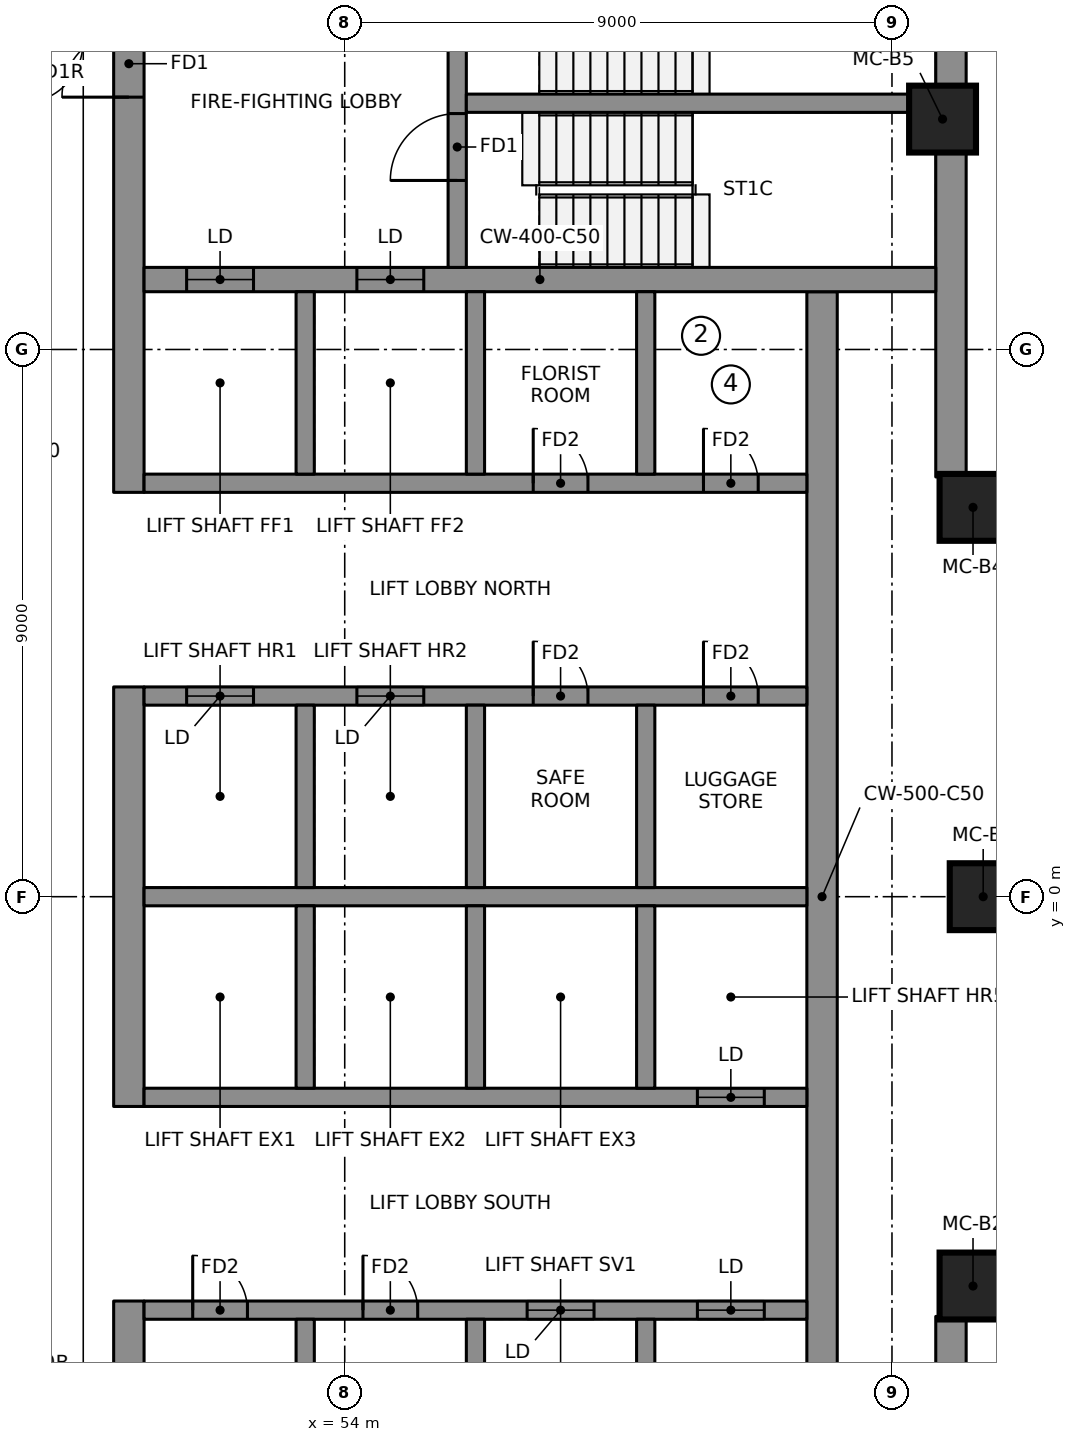
"""IFC4 building model, lengths in metres.
Left out: names, types, materials, properties, quantities, classifications, styles, units other than length and angle.
Written with IfcOpenShell. Run it as: python <this file> out.ifc"""

import sys

from ifc_helpers import new_model, si_unit, direction, frame, frame_2d, origin, origin_2d, place, context, subcontext, project, spatial, polyline, rectangle, outline, extrude, element, fill, save


model = new_model("IFC4")
c1 = context("Model", 3, precision=1e-05, world=origin(), true_north=direction((0.0, 1.0)))
c2 = subcontext(c1, "Body", "Model", "MODEL_VIEW")
j1 = project(units=[si_unit("LENGTHUNIT", "METRE"), si_unit("PLANEANGLEUNIT", "RADIAN")], contexts=[c1])
p1 = place(None, origin())
s1 = spatial("IfcSite", under=j1, at=p1, CompositionType="ELEMENT")
p2 = place(p1, origin())
s2 = spatial("IfcBuilding", under=s1, at=p2, CompositionType="ELEMENT")
p3 = place(p2, frame((0.0, 0.0, 292.75)))
s3 = spatial("IfcBuildingStorey", under=s2, at=p3, CompositionType="ELEMENT", Elevation=292.75)
p4 = place(p3, frame((50.45, 6.65, 0.0), z_axis=(0.0, 0.0, 1.0), x_axis=(0.0, 1.0, 0.0)))
e1 = element("IfcWall", 1, at=p4, inside=s3, PredefinedType="SHEAR", context=c2, shape_type="SweptSolid", body=[
    extrude(rectangle(XDim=9.6, YDim=0.5, at=frame_2d((4.8, 0.0))), origin(), (0.0, 0.0, 1.0), 3.55),
])
p5 = place(p4, frame((6.5, 0.0, 0.0)))
e2 = element("IfcOpeningElement", 2, at=p5, cuts=e1, PredefinedType="OPENING", context=c2, shape_type="SweptSolid", body=[
    extrude(rectangle(XDim=1.1, YDim=2.1, at=frame_2d((0.55, 1.05))), frame((0.0, 0.26, 0.0), z_axis=(0.0, -1.0, 0.0), x_axis=(1.0, 0.0, 0.0)), (0.0, 0.0, 1.0), 0.52),
])
p6 = place(p3, frame((50.45, -3.45, 0.0), z_axis=(0.0, 0.0, 1.0), x_axis=(0.0, 1.0, 0.0)))
e3 = element("IfcWall", 3, at=p6, inside=s3, PredefinedType="SHEAR", context=c2, shape_type="SweptSolid", body=[
    extrude(rectangle(XDim=6.9, YDim=0.5, at=frame_2d((3.45, 0.0))), origin(), (0.0, 0.0, 1.0), 3.55),
])
p7 = place(p3, frame((50.45, -16.25, 0.0), z_axis=(0.0, 0.0, 1.0), x_axis=(0.0, 1.0, 0.0)))
e4 = element("IfcWall", 4, at=p7, inside=s3, PredefinedType="SHEAR", context=c2, shape_type="SweptSolid", body=[
    extrude(rectangle(XDim=9.6, YDim=0.5, at=frame_2d((4.8, 0.0))), origin(), (0.0, 0.0, 1.0), 3.55),
])
p8 = place(p7, frame((2.0, 0.0, 0.0)))
e5 = element("IfcOpeningElement", 5, at=p8, cuts=e4, PredefinedType="OPENING", context=c2, shape_type="SweptSolid", body=[
    extrude(rectangle(XDim=1.1, YDim=2.1, at=frame_2d((0.55, 1.05))), frame((0.0, 0.26, 0.0), z_axis=(0.0, -1.0, 0.0), x_axis=(1.0, 0.0, 0.0)), (0.0, 0.0, 1.0), 0.52),
])
for number, where, z_axis, x_axis in (
    (6, (63.97, 6.903, 0.0), (0.0, 0.0, 1.0), (0.0, 1.0, 0.0)),
    (7, (63.97, -15.75, 0.0), (0.0, 0.0, 1.0), (0.0, 1.0, 0.0)),
):
    element("IfcWall", number, at=place(p3, frame(where, z_axis=z_axis, x_axis=x_axis)), inside=s3, PredefinedType="SHEAR", context=c2, shape_type="SweptSolid", body=[
        extrude(rectangle(XDim=8.847, YDim=0.5, at=frame_2d((4.423, 0.0))), origin(), (0.0, 0.0, 1.0), 3.55),
    ])
p9 = place(p3, frame((61.85, -9.95, 0.0), z_axis=(0.0, 0.0, 1.0), x_axis=(0.0, 1.0, 0.0)))
e8 = element("IfcWall", 8, at=p9, inside=s3, PredefinedType="SHEAR", context=c2, shape_type="SweptSolid", body=[
    extrude(rectangle(XDim=19.9, YDim=0.5, at=frame_2d((9.95, 0.0))), origin(), (0.0, 0.0, 1.0), 3.55),
])
p10 = place(p3, frame((50.7, 10.15, 0.0), z_axis=(0.0, 0.0, 1.0), x_axis=(1.0, 0.0, 0.0)))
e9 = element("IfcWall", 9, at=p10, inside=s3, PredefinedType="SHEAR", context=c2, shape_type="SweptSolid", body=[
    extrude(rectangle(XDim=13.02, YDim=0.4, at=frame_2d((6.51, 0.0))), origin(), (0.0, 0.0, 1.0), 3.55),
])
p11 = place(p10, frame((0.7, 0.0, 0.0)))
e10 = element("IfcOpeningElement", 10, at=p11, cuts=e9, PredefinedType="OPENING", context=c2, shape_type="SweptSolid", body=[
    extrude(rectangle(XDim=1.1, YDim=2.1, at=frame_2d((0.55, 1.05))), frame((0.0, 0.21, 0.0), z_axis=(0.0, -1.0, 0.0), x_axis=(1.0, 0.0, 0.0)), (0.0, 0.0, 1.0), 0.42),
])
p12 = place(p10, frame((3.5, 0.0, 0.0)))
e11 = element("IfcOpeningElement", 11, at=p12, cuts=e9, PredefinedType="OPENING", context=c2, shape_type="SweptSolid", body=[
    extrude(rectangle(XDim=1.1, YDim=2.1, at=frame_2d((0.55, 1.05))), frame((0.0, 0.21, 0.0), z_axis=(0.0, -1.0, 0.0), x_axis=(1.0, 0.0, 0.0)), (0.0, 0.0, 1.0), 0.42),
])
p13 = place(p3, frame((50.7, 0.0, 0.0), z_axis=(0.0, 0.0, 1.0), x_axis=(1.0, 0.0, 0.0)))
e12 = element("IfcWall", 12, at=p13, inside=s3, PredefinedType="SHEAR", context=c2, shape_type="SweptSolid", body=[
    extrude(rectangle(XDim=10.9, YDim=0.3, at=frame_2d((5.45, 0.0))), origin(), (0.0, 0.0, 1.0), 3.55),
])
p14 = place(p3, frame((50.7, 3.3, 0.0), z_axis=(0.0, 0.0, 1.0), x_axis=(1.0, 0.0, 0.0)))
e13 = element("IfcWall", 13, at=p14, inside=s3, PredefinedType="SHEAR", context=c2, shape_type="SweptSolid", body=[
    extrude(rectangle(XDim=10.9, YDim=0.3, at=frame_2d((5.45, 0.0))), origin(), (0.0, 0.0, 1.0), 3.55),
])
p15 = place(p14, frame((0.7, 0.0, 0.0)))
e14 = element("IfcOpeningElement", 14, at=p15, cuts=e13, PredefinedType="OPENING", context=c2, shape_type="SweptSolid", body=[
    extrude(rectangle(XDim=1.1, YDim=2.1, at=frame_2d((0.55, 1.05))), frame((0.0, 0.16, 0.0), z_axis=(0.0, -1.0, 0.0), x_axis=(1.0, 0.0, 0.0)), (0.0, 0.0, 1.0), 0.32),
])
p16 = place(p14, frame((3.5, 0.0, 0.0)))
e15 = element("IfcOpeningElement", 15, at=p16, cuts=e13, PredefinedType="OPENING", context=c2, shape_type="SweptSolid", body=[
    extrude(rectangle(XDim=1.1, YDim=2.1, at=frame_2d((0.55, 1.05))), frame((0.0, 0.16, 0.0), z_axis=(0.0, -1.0, 0.0), x_axis=(1.0, 0.0, 0.0)), (0.0, 0.0, 1.0), 0.32),
])
p17 = place(p14, frame((6.4, 0.0, 0.0)))
e16 = element("IfcOpeningElement", 16, at=p17, cuts=e13, PredefinedType="OPENING", context=c2, shape_type="SweptSolid", body=[
    extrude(rectangle(XDim=0.9, YDim=2.1, at=frame_2d((0.45, 1.05))), frame((0.0, 0.16, 0.0), z_axis=(0.0, -1.0, 0.0), x_axis=(1.0, 0.0, 0.0)), (0.0, 0.0, 1.0), 0.32),
])
p18 = place(p14, frame((9.2, 0.0, 0.0)))
e17 = element("IfcOpeningElement", 17, at=p18, cuts=e13, PredefinedType="OPENING", context=c2, shape_type="SweptSolid", body=[
    extrude(rectangle(XDim=0.9, YDim=2.1, at=frame_2d((0.45, 1.05))), frame((0.0, 0.16, 0.0), z_axis=(0.0, -1.0, 0.0), x_axis=(1.0, 0.0, 0.0)), (0.0, 0.0, 1.0), 0.32),
])
p19 = place(p3, frame((50.7, 6.8, 0.0), z_axis=(0.0, 0.0, 1.0), x_axis=(1.0, 0.0, 0.0)))
e18 = element("IfcWall", 18, at=p19, inside=s3, PredefinedType="SHEAR", context=c2, shape_type="SweptSolid", body=[
    extrude(rectangle(XDim=10.9, YDim=0.3, at=frame_2d((5.45, 0.0))), origin(), (0.0, 0.0, 1.0), 3.55),
])
p20 = place(p19, frame((6.4, 0.0, 0.0)))
e19 = element("IfcOpeningElement", 19, at=p20, cuts=e18, PredefinedType="OPENING", context=c2, shape_type="SweptSolid", body=[
    extrude(rectangle(XDim=0.9, YDim=2.1, at=frame_2d((0.45, 1.05))), frame((0.0, 0.16, 0.0), z_axis=(0.0, -1.0, 0.0), x_axis=(1.0, 0.0, 0.0)), (0.0, 0.0, 1.0), 0.32),
])
p21 = place(p19, frame((9.2, 0.0, 0.0)))
e20 = element("IfcOpeningElement", 20, at=p21, cuts=e18, PredefinedType="OPENING", context=c2, shape_type="SweptSolid", body=[
    extrude(rectangle(XDim=0.9, YDim=2.1, at=frame_2d((0.45, 1.05))), frame((0.0, 0.16, 0.0), z_axis=(0.0, -1.0, 0.0), x_axis=(1.0, 0.0, 0.0)), (0.0, 0.0, 1.0), 0.32),
])
for number, where, z_axis, x_axis in (
    (21, (53.35, 0.15, 0.0), (0.0, 0.0, 1.0), (0.0, 1.0, 0.0)),
    (22, (53.35, 6.95, 0.0), (0.0, 0.0, 1.0), (0.0, 1.0, 0.0)),
    (23, (56.15, 0.15, 0.0), (0.0, 0.0, 1.0), (0.0, 1.0, 0.0)),
    (24, (56.15, 6.95, 0.0), (0.0, 0.0, 1.0), (0.0, 1.0, 0.0)),
    (25, (58.95, 0.15, 0.0), (0.0, 0.0, 1.0), (0.0, 1.0, 0.0)),
    (26, (58.95, 6.95, 0.0), (0.0, 0.0, 1.0), (0.0, 1.0, 0.0)),
):
    element("IfcWall", number, at=place(p3, frame(where, z_axis=z_axis, x_axis=x_axis)), inside=s3, PredefinedType="SHEAR", context=c2, shape_type="SweptSolid", body=[
        extrude(rectangle(XDim=3.0, YDim=0.3, at=frame_2d((1.5, 0.0))), origin(), (0.0, 0.0, 1.0), 3.55),
    ])
p22 = place(p3, frame((50.7, -3.3, 0.0), z_axis=(0.0, 0.0, 1.0), x_axis=(1.0, 0.0, 0.0)))
e27 = element("IfcWall", 27, at=p22, inside=s3, PredefinedType="SHEAR", context=c2, shape_type="SweptSolid", body=[
    extrude(rectangle(XDim=10.9, YDim=0.3, at=frame_2d((5.45, 0.0))), origin(), (0.0, 0.0, 1.0), 3.55),
])
p23 = place(p22, frame((9.1, 0.0, 0.0)))
e28 = element("IfcOpeningElement", 28, at=p23, cuts=e27, PredefinedType="OPENING", context=c2, shape_type="SweptSolid", body=[
    extrude(rectangle(XDim=1.1, YDim=2.1, at=frame_2d((0.55, 1.05))), frame((0.0, 0.16, 0.0), z_axis=(0.0, -1.0, 0.0), x_axis=(1.0, 0.0, 0.0)), (0.0, 0.0, 1.0), 0.32),
])
p24 = place(p3, frame((50.7, -6.8, 0.0), z_axis=(0.0, 0.0, 1.0), x_axis=(1.0, 0.0, 0.0)))
e29 = element("IfcWall", 29, at=p24, inside=s3, PredefinedType="SHEAR", context=c2, shape_type="SweptSolid", body=[
    extrude(rectangle(XDim=10.9, YDim=0.3, at=frame_2d((5.45, 0.0))), origin(), (0.0, 0.0, 1.0), 3.55),
])
p25 = place(p24, frame((6.3, 0.0, 0.0)))
e30 = element("IfcOpeningElement", 30, at=p25, cuts=e29, PredefinedType="OPENING", context=c2, shape_type="SweptSolid", body=[
    extrude(rectangle(XDim=1.1, YDim=2.1, at=frame_2d((0.55, 1.05))), frame((0.0, 0.16, 0.0), z_axis=(0.0, -1.0, 0.0), x_axis=(1.0, 0.0, 0.0)), (0.0, 0.0, 1.0), 0.32),
])
p26 = place(p24, frame((9.1, 0.0, 0.0)))
e31 = element("IfcOpeningElement", 31, at=p26, cuts=e29, PredefinedType="OPENING", context=c2, shape_type="SweptSolid", body=[
    extrude(rectangle(XDim=1.1, YDim=2.1, at=frame_2d((0.55, 1.05))), frame((0.0, 0.16, 0.0), z_axis=(0.0, -1.0, 0.0), x_axis=(1.0, 0.0, 0.0)), (0.0, 0.0, 1.0), 0.32),
])
p27 = place(p24, frame((0.8, 0.0, 0.0)))
e32 = element("IfcOpeningElement", 32, at=p27, cuts=e29, PredefinedType="OPENING", context=c2, shape_type="SweptSolid", body=[
    extrude(rectangle(XDim=0.9, YDim=2.1, at=frame_2d((0.45, 1.05))), frame((0.0, 0.16, 0.0), z_axis=(0.0, -1.0, 0.0), x_axis=(1.0, 0.0, 0.0)), (0.0, 0.0, 1.0), 0.32),
])
p28 = place(p24, frame((3.6, 0.0, 0.0)))
e33 = element("IfcOpeningElement", 33, at=p28, cuts=e29, PredefinedType="OPENING", context=c2, shape_type="SweptSolid", body=[
    extrude(rectangle(XDim=0.9, YDim=2.1, at=frame_2d((0.45, 1.05))), frame((0.0, 0.16, 0.0), z_axis=(0.0, -1.0, 0.0), x_axis=(1.0, 0.0, 0.0)), (0.0, 0.0, 1.0), 0.32),
])
for number, where, z_axis, x_axis in (
    (34, (53.35, -3.15, 0.0), (0.0, 0.0, 1.0), (0.0, 1.0, 0.0)),
    (35, (53.35, -9.95, 0.0), (0.0, 0.0, 1.0), (0.0, 1.0, 0.0)),
    (36, (56.15, -3.15, 0.0), (0.0, 0.0, 1.0), (0.0, 1.0, 0.0)),
    (37, (56.15, -9.95, 0.0), (0.0, 0.0, 1.0), (0.0, 1.0, 0.0)),
    (38, (58.95, -3.15, 0.0), (0.0, 0.0, 1.0), (0.0, 1.0, 0.0)),
    (39, (58.95, -9.95, 0.0), (0.0, 0.0, 1.0), (0.0, 1.0, 0.0)),
):
    element("IfcWall", number, at=place(p3, frame(where, z_axis=z_axis, x_axis=x_axis)), inside=s3, PredefinedType="SHEAR", context=c2, shape_type="SweptSolid", body=[
        extrude(rectangle(XDim=3.0, YDim=0.3, at=frame_2d((1.5, 0.0))), origin(), (0.0, 0.0, 1.0), 3.55),
    ])
p29 = place(p3, frame((55.85, 10.35, 0.0), z_axis=(0.0, 0.0, 1.0), x_axis=(0.0, 1.0, 0.0)))
e40 = element("IfcWall", 40, at=p29, inside=s3, PredefinedType="SHEAR", context=c2, shape_type="SweptSolid", body=[
    extrude(rectangle(XDim=5.4, YDim=0.3, at=frame_2d((2.7, 0.0))), origin(), (0.0, 0.0, 1.0), 3.55),
])
p30 = place(p29, frame((1.43, 0.0, 0.0)))
e41 = element("IfcOpeningElement", 41, at=p30, cuts=e40, PredefinedType="OPENING", context=c2, shape_type="SweptSolid", body=[
    extrude(rectangle(XDim=1.1, YDim=2.1, at=frame_2d((0.55, 1.05))), frame((0.0, 0.16, 0.0), z_axis=(0.0, -1.0, 0.0), x_axis=(1.0, 0.0, 0.0)), (0.0, 0.0, 1.0), 0.32),
])
p31 = place(p29, frame((3.6, 0.0, 0.0)))
e42 = element("IfcOpeningElement", 42, at=p31, cuts=e40, PredefinedType="OPENING", context=c2, shape_type="SweptSolid", body=[
    extrude(rectangle(XDim=1.1, YDim=2.1, at=frame_2d((0.55, 1.05))), frame((0.0, 0.16, 0.0), z_axis=(0.0, -1.0, 0.0), x_axis=(1.0, 0.0, 0.0)), (0.0, 0.0, 1.0), 0.32),
])
p32 = place(p3, frame((56.0, 13.05, 0.0), z_axis=(0.0, 0.0, 1.0), x_axis=(1.0, 0.0, 0.0)))
e43 = element("IfcWall", 43, at=p32, inside=s3, PredefinedType="SHEAR", context=c2, shape_type="SweptSolid", body=[
    extrude(rectangle(XDim=7.72, YDim=0.3, at=frame_2d((3.86, 0.0))), origin(), (0.0, 0.0, 1.0), 3.55),
])
for number, where, z_axis, x_axis in (
    (44, (64.333, -6.403, 0.0), (0.0, 0.0, 1.0), (1.0, 0.0, 0.0)),
    (45, (64.5, 0.0, 0.0), (0.0, 0.0, 1.0), (1.0, 0.0, 0.0)),
    (46, (64.333, 6.403, 0.0), (0.0, 0.0, 1.0), (1.0, 0.0, 0.0)),
    (47, (63.832, 12.789, 0.0), (0.0, 0.0, 1.0), (1.0, 0.0, 0.0)),
):
    element("IfcColumn", number, at=place(p3, frame(where, z_axis=z_axis, x_axis=x_axis)), inside=s3, PredefinedType="COLUMN", context=c2, shape_type="SweptSolid", body=[
        extrude(rectangle(XDim=1.1, YDim=1.1, at=origin_2d()), origin(), (0.0, 0.0, 1.0), 3.55),
    ])
p33 = place(p3, frame((65.331, 10.571, 0.0), z_axis=(0.0, 0.0, 1.0), x_axis=(-0.102249826987, 0.994758751096, 0.0)))
e48 = element("IfcWall", 48, at=p33, inside=s3, PredefinedType="NOTDEFINED", context=c2, shape_type="SweptSolid", body=[
    extrude(outline(polyline([(-0.003, -0.2), (4.263, -0.2), (4.204, 0.2), (0.003, 0.2), (-0.003, -0.2)])), origin(), (0.0, 0.0, 1.0), 3.25),
])
p34 = place(p33, frame((0.417, 0.0, 0.5)))
e49 = element("IfcOpeningElement", 49, at=p34, cuts=e48, PredefinedType="OPENING", context=c2, shape_type="SweptSolid", body=[
    extrude(rectangle(XDim=2.4, YDim=2.0, at=frame_2d((1.2, 1.0))), frame((0.0, 0.21, 0.0), z_axis=(0.0, -1.0, 0.0), x_axis=(1.0, 0.0, 0.0)), (0.0, 0.0, 1.0), 0.42),
])
p35 = place(p11, origin())
e50 = element("IfcDoor", 50, at=p35, inside=s3, OperationType="DOUBLE_DOOR_SLIDING", PredefinedType="DOOR", context=c2, shape_type="SweptSolid", body=[
    extrude(rectangle(XDim=1.1, YDim=2.1, at=frame_2d((0.55, 1.05))), frame((0.0, 0.025, 0.0), z_axis=(0.0, -1.0, 0.0), x_axis=(1.0, 0.0, 0.0)), (0.0, 0.0, 1.0), 0.05),
])
fill(e10, e50)
p36 = place(p12, origin())
e51 = element("IfcDoor", 51, at=p36, inside=s3, OperationType="DOUBLE_DOOR_SLIDING", PredefinedType="DOOR", context=c2, shape_type="SweptSolid", body=[
    extrude(rectangle(XDim=1.1, YDim=2.1, at=frame_2d((0.55, 1.05))), frame((0.0, 0.025, 0.0), z_axis=(0.0, -1.0, 0.0), x_axis=(1.0, 0.0, 0.0)), (0.0, 0.0, 1.0), 0.05),
])
fill(e11, e51)
p37 = place(p15, origin())
e52 = element("IfcDoor", 52, at=p37, inside=s3, OperationType="DOUBLE_DOOR_SLIDING", PredefinedType="DOOR", context=c2, shape_type="SweptSolid", body=[
    extrude(rectangle(XDim=1.1, YDim=2.1, at=frame_2d((0.55, 1.05))), frame((0.0, 0.025, 0.0), z_axis=(0.0, -1.0, 0.0), x_axis=(1.0, 0.0, 0.0)), (0.0, 0.0, 1.0), 0.05),
])
fill(e14, e52)
p38 = place(p16, origin())
e53 = element("IfcDoor", 53, at=p38, inside=s3, OperationType="DOUBLE_DOOR_SLIDING", PredefinedType="DOOR", context=c2, shape_type="SweptSolid", body=[
    extrude(rectangle(XDim=1.1, YDim=2.1, at=frame_2d((0.55, 1.05))), frame((0.0, 0.025, 0.0), z_axis=(0.0, -1.0, 0.0), x_axis=(1.0, 0.0, 0.0)), (0.0, 0.0, 1.0), 0.05),
])
fill(e15, e53)
p39 = place(p23, origin())
e54 = element("IfcDoor", 54, at=p39, inside=s3, OperationType="DOUBLE_DOOR_SLIDING", PredefinedType="DOOR", context=c2, shape_type="SweptSolid", body=[
    extrude(rectangle(XDim=1.1, YDim=2.1, at=frame_2d((0.55, 1.05))), frame((0.0, 0.025, 0.0), z_axis=(0.0, -1.0, 0.0), x_axis=(1.0, 0.0, 0.0)), (0.0, 0.0, 1.0), 0.05),
])
fill(e28, e54)
p40 = place(p25, origin())
e55 = element("IfcDoor", 55, at=p40, inside=s3, OperationType="DOUBLE_DOOR_SLIDING", PredefinedType="DOOR", context=c2, shape_type="SweptSolid", body=[
    extrude(rectangle(XDim=1.1, YDim=2.1, at=frame_2d((0.55, 1.05))), frame((0.0, 0.025, 0.0), z_axis=(0.0, -1.0, 0.0), x_axis=(1.0, 0.0, 0.0)), (0.0, 0.0, 1.0), 0.05),
])
fill(e30, e55)
p41 = place(p26, origin())
e56 = element("IfcDoor", 56, at=p41, inside=s3, OperationType="DOUBLE_DOOR_SLIDING", PredefinedType="DOOR", context=c2, shape_type="SweptSolid", body=[
    extrude(rectangle(XDim=1.1, YDim=2.1, at=frame_2d((0.55, 1.05))), frame((0.0, 0.025, 0.0), z_axis=(0.0, -1.0, 0.0), x_axis=(1.0, 0.0, 0.0)), (0.0, 0.0, 1.0), 0.05),
])
fill(e31, e56)
p42 = place(p30, origin())
e57 = element("IfcDoor", 57, at=p42, inside=s3, OperationType="SINGLE_SWING_RIGHT", PredefinedType="DOOR", context=c2, shape_type="SweptSolid", body=[
    extrude(rectangle(XDim=1.1, YDim=2.1, at=frame_2d((0.55, 1.05))), frame((0.0, 0.025, 0.0), z_axis=(0.0, -1.0, 0.0), x_axis=(1.0, 0.0, 0.0)), (0.0, 0.0, 1.0), 0.05),
])
fill(e41, e57)
p43 = place(p5, origin())
e58 = element("IfcDoor", 58, at=p43, inside=s3, OperationType="SINGLE_SWING_RIGHT", PredefinedType="DOOR", context=c2, shape_type="SweptSolid", body=[
    extrude(rectangle(XDim=1.1, YDim=2.1, at=frame_2d((0.55, 1.05))), frame((0.0, 0.025, 0.0), z_axis=(0.0, -1.0, 0.0), x_axis=(1.0, 0.0, 0.0)), (0.0, 0.0, 1.0), 0.05),
])
fill(e2, e58)
p44 = place(p20, origin())
e59 = element("IfcDoor", 59, at=p44, inside=s3, OperationType="SINGLE_SWING_LEFT", PredefinedType="DOOR", context=c2, shape_type="SweptSolid", body=[
    extrude(rectangle(XDim=0.9, YDim=2.1, at=frame_2d((0.45, 1.05))), frame((0.0, 0.025, 0.0), z_axis=(0.0, -1.0, 0.0), x_axis=(1.0, 0.0, 0.0)), (0.0, 0.0, 1.0), 0.05),
])
fill(e19, e59)
p45 = place(p21, origin())
e60 = element("IfcDoor", 60, at=p45, inside=s3, OperationType="SINGLE_SWING_LEFT", PredefinedType="DOOR", context=c2, shape_type="SweptSolid", body=[
    extrude(rectangle(XDim=0.9, YDim=2.1, at=frame_2d((0.45, 1.05))), frame((0.0, 0.025, 0.0), z_axis=(0.0, -1.0, 0.0), x_axis=(1.0, 0.0, 0.0)), (0.0, 0.0, 1.0), 0.05),
])
fill(e20, e60)
p46 = place(p17, origin())
e61 = element("IfcDoor", 61, at=p46, inside=s3, OperationType="SINGLE_SWING_LEFT", PredefinedType="DOOR", context=c2, shape_type="SweptSolid", body=[
    extrude(rectangle(XDim=0.9, YDim=2.1, at=frame_2d((0.45, 1.05))), frame((0.0, 0.025, 0.0), z_axis=(0.0, -1.0, 0.0), x_axis=(1.0, 0.0, 0.0)), (0.0, 0.0, 1.0), 0.05),
])
fill(e16, e61)
p47 = place(p18, origin())
e62 = element("IfcDoor", 62, at=p47, inside=s3, OperationType="SINGLE_SWING_LEFT", PredefinedType="DOOR", context=c2, shape_type="SweptSolid", body=[
    extrude(rectangle(XDim=0.9, YDim=2.1, at=frame_2d((0.45, 1.05))), frame((0.0, 0.025, 0.0), z_axis=(0.0, -1.0, 0.0), x_axis=(1.0, 0.0, 0.0)), (0.0, 0.0, 1.0), 0.05),
])
fill(e17, e62)
p48 = place(p27, origin())
e63 = element("IfcDoor", 63, at=p48, inside=s3, OperationType="SINGLE_SWING_LEFT", PredefinedType="DOOR", context=c2, shape_type="SweptSolid", body=[
    extrude(rectangle(XDim=0.9, YDim=2.1, at=frame_2d((0.45, 1.05))), frame((0.0, 0.025, 0.0), z_axis=(0.0, -1.0, 0.0), x_axis=(1.0, 0.0, 0.0)), (0.0, 0.0, 1.0), 0.05),
])
fill(e32, e63)
p49 = place(p28, origin())
e64 = element("IfcDoor", 64, at=p49, inside=s3, OperationType="SINGLE_SWING_LEFT", PredefinedType="DOOR", context=c2, shape_type="SweptSolid", body=[
    extrude(rectangle(XDim=0.9, YDim=2.1, at=frame_2d((0.45, 1.05))), frame((0.0, 0.025, 0.0), z_axis=(0.0, -1.0, 0.0), x_axis=(1.0, 0.0, 0.0)), (0.0, 0.0, 1.0), 0.05),
])
fill(e33, e64)
save(model, sys.argv[1])
